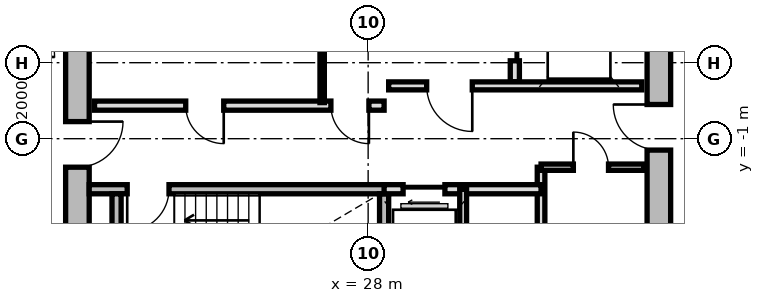
"""IFC4 building model, lengths in metres.
Left out: names, types, materials, properties, quantities, classifications, styles, units other than length and angle.
Written with IfcOpenShell. Run it as: python <this file> out.ifc"""

import sys

from ifc_helpers import new_model, si_unit, direction, frame, frame_2d, origin, place, context, subcontext, project, spatial, rectangle, extrude, source, transform, mapped, element, fill, save


model = new_model("IFC4")
c1 = context("Model", 3, precision=1e-05, world=origin(), true_north=direction((0.0, 1.0)))
c2 = subcontext(c1, "Body", "Model", "MODEL_VIEW")
j1 = project(units=[si_unit("LENGTHUNIT", "METRE"), si_unit("PLANEANGLEUNIT", "RADIAN")], contexts=[c1])
p1 = place(None, origin())
s1 = spatial("IfcSite", under=j1, at=p1, CompositionType="ELEMENT")
p2 = place(p1, origin())
s2 = spatial("IfcBuilding", under=s1, at=p2, CompositionType="ELEMENT")
p3 = place(p2, frame((0.0, 0.0, 134.3)))
s3 = spatial("IfcBuildingStorey", under=s2, at=p3, CompositionType="ELEMENT", Elevation=134.3)
m1 = source(origin(), c2, "Body", "SweptSolid", [
    extrude(rectangle(XDim=11.1, YDim=0.62, at=frame_2d((5.55, 0.0))), origin(), (0.0, 0.0, 1.0), 2.81),
])
p4 = place(p3, frame((20.35, -5.55, 0.0), z_axis=(0.0, 0.0, 1.0), x_axis=(0.0, 1.0, 0.0)))
e1 = element("IfcWall", 1, at=p4, inside=s3, PredefinedType="SHEAR", context=c2, shape_type="MappedRepresentation", body=[
    mapped(m1, transform((0.0, 0.0, 0.0), x_axis=(1.0, 0.0, 0.0), y_axis=(0.0, 1.0, 0.0), z_axis=(0.0, 0.0, 1.0), scale=1.0)),
])
p5 = place(p4, frame((3.8, 0.0, 0.0)))
e2 = element("IfcOpeningElement", 2, at=p5, cuts=e1, PredefinedType="OPENING", context=c2, shape_type="SweptSolid", body=[
    extrude(rectangle(XDim=1.2, YDim=2.15, at=frame_2d((0.6, 1.075))), frame((0.0, 0.32, 0.0), z_axis=(0.0, -1.0, 0.0), x_axis=(1.0, 0.0, 0.0)), (0.0, 0.0, 1.0), 0.64),
])
p6 = place(p3, frame((35.65, 5.55, 0.0), z_axis=(0.0, 0.0, 1.0), x_axis=(0.0, -1.0, 0.0)))
e3 = element("IfcWall", 3, at=p6, inside=s3, PredefinedType="SHEAR", context=c2, shape_type="MappedRepresentation", body=[
    mapped(m1, transform((0.0, 0.0, 0.0), x_axis=(1.0, 0.0, 0.0), y_axis=(0.0, 1.0, 0.0), z_axis=(0.0, 0.0, 1.0), scale=1.0)),
])
p7 = place(p6, frame((5.65, 0.0, 0.0)))
e4 = element("IfcOpeningElement", 4, at=p7, cuts=e3, PredefinedType="OPENING", context=c2, shape_type="SweptSolid", body=[
    extrude(rectangle(XDim=1.2, YDim=2.15, at=frame_2d((0.6, 1.075))), frame((0.0, 0.32, 0.0), z_axis=(0.0, -1.0, 0.0), x_axis=(1.0, 0.0, 0.0)), (0.0, 0.0, 1.0), 0.64),
])
p8 = place(p6, frame((9.3, 0.0, 0.0)))
e5 = element("IfcOpeningElement", 5, at=p8, cuts=e3, PredefinedType="OPENING", context=c2, shape_type="SweptSolid", body=[
    extrude(rectangle(XDim=1.0, YDim=2.1, at=frame_2d((0.5, 1.05))), frame((0.0, 0.32, 0.0), z_axis=(0.0, -1.0, 0.0), x_axis=(1.0, 0.0, 0.0)), (0.0, 0.0, 1.0), 0.64),
])
m2 = source(origin(), c2, "Body", "SweptSolid", [
    extrude(rectangle(XDim=7.88, YDim=0.24, at=frame_2d((3.94, 0.0))), origin(), (0.0, 0.0, 1.0), 2.81),
])
p9 = place(p3, frame((20.66, -2.33, 0.0), z_axis=(0.0, 0.0, 1.0), x_axis=(1.0, 0.0, 0.0)))
e6 = element("IfcWall", 6, at=p9, inside=s3, PredefinedType="PARTITIONING", context=c2, shape_type="MappedRepresentation", body=[
    mapped(m2, transform((0.0, 0.0, 0.0), x_axis=(1.0, 0.0, 0.0), y_axis=(0.0, 1.0, 0.0), z_axis=(0.0, 0.0, 1.0), scale=1.0)),
])
p10 = place(p9, frame((1.0, 0.0, 0.0)))
e7 = element("IfcOpeningElement", 7, at=p10, cuts=e6, PredefinedType="OPENING", context=c2, shape_type="SweptSolid", body=[
    extrude(rectangle(XDim=1.1, YDim=2.15, at=frame_2d((0.55, 1.075))), frame((0.0, 0.13, 0.0), z_axis=(0.0, -1.0, 0.0), x_axis=(1.0, 0.0, 0.0)), (0.0, 0.0, 1.0), 0.26),
])
m3 = source(origin(), c2, "Body", "SweptSolid", [
    extrude(rectangle(XDim=3.19, YDim=0.24, at=frame_2d((1.595, 0.0))), origin(), (0.0, 0.0, 1.0), 2.81),
])
for number, where, z_axis, x_axis in (
    (8, (21.38, -5.64, 0.0), (0.0, 0.0, 1.0), (0.0, 1.0, 0.0)),
    (9, (28.42, -5.64, 0.0), (0.0, 0.0, 1.0), (0.0, 1.0, 0.0)),
):
    element("IfcWall", number, at=place(p3, frame(where, z_axis=z_axis, x_axis=x_axis)), inside=s3, PredefinedType="PARTITIONING", context=c2, shape_type="MappedRepresentation", body=[
        mapped(m3, transform((0.0, 0.0, 0.0), x_axis=(1.0, 0.0, 0.0), y_axis=(0.0, 1.0, 0.0), z_axis=(0.0, 0.0, 1.0), scale=1.0)),
    ])
m4 = source(origin(), c2, "Body", "SweptSolid", [
    extrude(rectangle(XDim=5.0, YDim=0.24, at=frame_2d((2.5, 0.0))), origin(), (0.0, 0.0, 1.0), 2.795),
])
p11 = place(p3, frame((31.86, 0.5, 0.0), z_axis=(0.0, 0.0, 1.0), x_axis=(0.0, 1.0, 0.0)))
e10 = element("IfcWall", 10, at=p11, inside=s3, PredefinedType="PARTITIONING", context=c2, shape_type="MappedRepresentation", body=[
    mapped(m4, transform((0.0, 0.0, 0.0), x_axis=(1.0, 0.0, 0.0), y_axis=(0.0, 1.0, 0.0), z_axis=(0.0, 0.0, 1.0), scale=1.0)),
])
p12 = place(p11, frame((3.05, 0.0, 0.0)))
e11 = element("IfcOpeningElement", 11, at=p12, cuts=e10, PredefinedType="OPENING", context=c2, shape_type="SweptSolid", body=[
    extrude(rectangle(XDim=1.3, YDim=2.2, at=frame_2d((0.65, 1.1))), frame((0.0, 0.13, 0.0), z_axis=(0.0, -1.0, 0.0), x_axis=(1.0, 0.0, 0.0)), (0.0, 0.0, 1.0), 0.26),
])
p13 = place(p11, frame((0.55, 0.0, 0.0)))
e12 = element("IfcOpeningElement", 12, at=p13, cuts=e10, PredefinedType="OPENING", context=c2, shape_type="SweptSolid", body=[
    extrude(rectangle(XDim=1.3, YDim=2.2, at=frame_2d((0.65, 1.1))), frame((0.0, 0.13, 0.0), z_axis=(0.0, -1.0, 0.0), x_axis=(1.0, 0.0, 0.0)), (0.0, 0.0, 1.0), 0.26),
])
m5 = source(origin(), c2, "Body", "SweptSolid", [
    extrude(rectangle(XDim=6.66, YDim=0.21, at=frame_2d((3.33, 0.0))), origin(), (0.0, 0.0, 1.0), 2.795),
])
p14 = place(p3, frame((28.54, 0.39, 0.0), z_axis=(0.0, 0.0, 1.0), x_axis=(1.0, 0.0, 0.0)))
e13 = element("IfcWall", 13, at=p14, inside=s3, PredefinedType="PARTITIONING", context=c2, shape_type="MappedRepresentation", body=[
    mapped(m5, transform((0.0, 0.0, 0.0), x_axis=(1.0, 0.0, 0.0), y_axis=(0.0, 1.0, 0.0), z_axis=(0.0, 0.0, 1.0), scale=1.0)),
])
p15 = place(p14, frame((1.0, 0.0, 0.0)))
e14 = element("IfcOpeningElement", 14, at=p15, cuts=e13, PredefinedType="OPENING", context=c2, shape_type="SweptSolid", body=[
    extrude(rectangle(XDim=1.2, YDim=2.15, at=frame_2d((0.6, 1.075))), frame((0.0, 0.115, 0.0), z_axis=(0.0, -1.0, 0.0), x_axis=(1.0, 0.0, 0.0)), (0.0, 0.0, 1.0), 0.23),
])
m6 = source(origin(), c2, "Body", "SweptSolid", [
    extrude(rectangle(XDim=7.62, YDim=0.24, at=frame_2d((3.81, 0.0))), origin(), (0.0, 0.0, 1.0), 2.795),
])
p16 = place(p3, frame((20.8, -0.13, 0.0), z_axis=(0.0, 0.0, 1.0), x_axis=(1.0, 0.0, 0.0)))
e15 = element("IfcWall", 15, at=p16, inside=s3, PredefinedType="PARTITIONING", context=c2, shape_type="MappedRepresentation", body=[
    mapped(m6, transform((0.0, 0.0, 0.0), x_axis=(1.0, 0.0, 0.0), y_axis=(0.0, 1.0, 0.0), z_axis=(0.0, 0.0, 1.0), scale=1.0)),
])
p17 = place(p16, frame((6.22, 0.0, 0.0)))
e16 = element("IfcOpeningElement", 16, at=p17, cuts=e15, PredefinedType="OPENING", context=c2, shape_type="SweptSolid", body=[
    extrude(rectangle(XDim=1.0, YDim=2.1, at=frame_2d((0.5, 1.05))), frame((0.0, 0.13, 0.0), z_axis=(0.0, -1.0, 0.0), x_axis=(1.0, 0.0, 0.0)), (0.0, 0.0, 1.0), 0.26),
])
p18 = place(p16, frame((2.4, 0.0, 0.0)))
e17 = element("IfcOpeningElement", 17, at=p18, cuts=e15, PredefinedType="OPENING", context=c2, shape_type="SweptSolid", body=[
    extrude(rectangle(XDim=1.0, YDim=2.1, at=frame_2d((0.5, 1.05))), frame((0.0, 0.13, 0.0), z_axis=(0.0, -1.0, 0.0), x_axis=(1.0, 0.0, 0.0)), (0.0, 0.0, 1.0), 0.26),
])
m7 = source(origin(), c2, "Body", "SweptSolid", [
    extrude(rectangle(XDim=2.33, YDim=0.115, at=frame_2d((1.165, 0.0))), origin(), (0.0, 0.0, 1.0), 2.795),
])
p19 = place(p3, frame((26.79, -0.05, 0.0), z_axis=(0.0, 0.0, 1.0), x_axis=(0.0, 1.0, 0.0)))
e18 = element("IfcWall", 18, at=p19, inside=s3, PredefinedType="PARTITIONING", context=c2, shape_type="MappedRepresentation", body=[
    mapped(m7, transform((0.0, 0.0, 0.0), x_axis=(1.0, 0.0, 0.0), y_axis=(0.0, 1.0, 0.0), z_axis=(0.0, 0.0, 1.0), scale=1.0)),
])
m8 = source(origin(), c2, "Body", "SweptSolid", [
    extrude(rectangle(XDim=3.8, YDim=0.2, at=frame_2d((1.9, 0.0))), origin(), (0.0, 0.0, 1.0), 2.795),
])
p20 = place(p3, frame((32.55, -5.55, 0.0), z_axis=(0.0, 0.0, 1.0), x_axis=(0.0, 1.0, 0.0)))
e19 = element("IfcWall", 19, at=p20, inside=s3, PredefinedType="PARTITIONING", context=c2, shape_type="MappedRepresentation", body=[
    mapped(m8, transform((0.0, 0.0, 0.0), x_axis=(1.0, 0.0, 0.0), y_axis=(0.0, 1.0, 0.0), z_axis=(0.0, 0.0, 1.0), scale=1.0)),
])
m9 = source(origin(), c2, "Body", "SweptSolid", [
    extrude(rectangle(XDim=4.13, YDim=0.24, at=frame_2d((2.065, 0.0))), origin(), (0.0, 0.0, 1.0), 2.795),
])
p21 = place(p3, frame((28.42, -2.33, 0.0), z_axis=(0.0, 0.0, 1.0), x_axis=(1.0, 0.0, 0.0)))
e20 = element("IfcWall", 20, at=p21, inside=s3, PredefinedType="PARTITIONING", context=c2, shape_type="MappedRepresentation", body=[
    mapped(m9, transform((0.0, 0.0, 0.0), x_axis=(1.0, 0.0, 0.0), y_axis=(0.0, 1.0, 0.0), z_axis=(0.0, 0.0, 1.0), scale=1.0)),
])
p22 = place(p21, frame((0.5, 0.0, 0.0)))
e21 = element("IfcOpeningElement", 21, at=p22, cuts=e20, PredefinedType="OPENING", context=c2, shape_type="SweptSolid", body=[
    extrude(rectangle(XDim=1.1, YDim=2.2, at=frame_2d((0.55, 1.1))), frame((0.0, 0.13, 0.0), z_axis=(0.0, -1.0, 0.0), x_axis=(1.0, 0.0, 0.0)), (0.0, 0.0, 1.0), 0.26),
])
m10 = source(origin(), c2, "Body", "SweptSolid", [
    extrude(rectangle(XDim=3.22, YDim=0.18, at=frame_2d((1.61, 0.0))), origin(), (0.0, 0.0, 1.0), 2.795),
])
p23 = place(p3, frame((30.5, -5.55, 0.0), z_axis=(0.0, 0.0, 1.0), x_axis=(0.0, 1.0, 0.0)))
e22 = element("IfcWall", 22, at=p23, inside=s3, PredefinedType="PARTITIONING", context=c2, shape_type="MappedRepresentation", body=[
    mapped(m10, transform((0.0, 0.0, 0.0), x_axis=(1.0, 0.0, 0.0), y_axis=(0.0, 1.0, 0.0), z_axis=(0.0, 0.0, 1.0), scale=1.0)),
])
m11 = source(origin(), c2, "Body", "SweptSolid", [
    extrude(rectangle(XDim=2.7, YDim=0.165, at=frame_2d((1.35, 0.0))), origin(), (0.0, 0.0, 1.0), 2.795),
])
p24 = place(p3, frame((32.55, -1.75, 0.0), z_axis=(0.0, 0.0, 1.0), x_axis=(1.0, 0.0, 0.0)))
e23 = element("IfcWall", 23, at=p24, inside=s3, PredefinedType="PARTITIONING", context=c2, shape_type="MappedRepresentation", body=[
    mapped(m11, transform((0.0, 0.0, 0.0), x_axis=(1.0, 0.0, 0.0), y_axis=(0.0, 1.0, 0.0), z_axis=(0.0, 0.0, 1.0), scale=1.0)),
])
p25 = place(p24, frame((0.85, 0.0, 0.0)))
e24 = element("IfcOpeningElement", 24, at=p25, cuts=e23, PredefinedType="OPENING", context=c2, shape_type="SweptSolid", body=[
    extrude(rectangle(XDim=0.925, YDim=2.1, at=frame_2d((0.462, 1.05))), frame((0.0, 0.093, 0.0), z_axis=(0.0, -1.0, 0.0), x_axis=(1.0, 0.0, 0.0)), (0.0, 0.0, 1.0), 0.185),
])
m12 = source(origin(), c2, "Body", "SweptSolid", [
    extrude(rectangle(XDim=1.1, YDim=2.15, at=frame_2d((0.55, 1.075))), frame((0.0, 0.025, 0.0), z_axis=(0.0, -1.0, 0.0), x_axis=(1.0, 0.0, 0.0)), (0.0, 0.0, 1.0), 0.05),
])
p26 = place(p10, frame((1.1, 0.0, 0.0), z_axis=(0.0, 0.0, 1.0), x_axis=(-1.0, 0.0, 0.0)))
e25 = element("IfcDoor", 25, at=p26, inside=s3, OperationType="SINGLE_SWING_RIGHT", PredefinedType="DOOR", context=c2, shape_type="MappedRepresentation", body=[
    mapped(m12, transform((0.0, 0.0, 0.0), x_axis=(1.0, 0.0, 0.0), y_axis=(0.0, 1.0, 0.0), z_axis=(0.0, 0.0, 1.0), scale=1.0)),
])
fill(e7, e25)
m13 = source(origin(), c2, "Body", "SweptSolid", [
    extrude(rectangle(XDim=1.3, YDim=2.2, at=frame_2d((0.65, 1.1))), frame((0.0, 0.025, 0.0), z_axis=(0.0, -1.0, 0.0), x_axis=(1.0, 0.0, 0.0)), (0.0, 0.0, 1.0), 0.05),
])
p27 = place(p13, origin())
e26 = element("IfcDoor", 26, at=p27, inside=s3, OperationType="SLIDING_TO_RIGHT", PredefinedType="DOOR", context=c2, shape_type="MappedRepresentation", body=[
    mapped(m13, transform((0.0, 0.0, 0.0), x_axis=(1.0, 0.0, 0.0), y_axis=(0.0, 1.0, 0.0), z_axis=(0.0, 0.0, 1.0), scale=1.0)),
])
fill(e12, e26)
m14 = source(origin(), c2, "Body", "SweptSolid", [
    extrude(rectangle(XDim=1.2, YDim=2.15, at=frame_2d((0.6, 1.075))), frame((0.0, 0.025, 0.0), z_axis=(0.0, -1.0, 0.0), x_axis=(1.0, 0.0, 0.0)), (0.0, 0.0, 1.0), 0.05),
])
p28 = place(p15, frame((1.2, 0.0, 0.0), z_axis=(0.0, 0.0, 1.0), x_axis=(-1.0, 0.0, 0.0)))
e27 = element("IfcDoor", 27, at=p28, inside=s3, OperationType="SINGLE_SWING_LEFT", PredefinedType="DOOR", context=c2, shape_type="MappedRepresentation", body=[
    mapped(m14, transform((0.0, 0.0, 0.0), x_axis=(1.0, 0.0, 0.0), y_axis=(0.0, 1.0, 0.0), z_axis=(0.0, 0.0, 1.0), scale=1.0)),
])
fill(e14, e27)
p29 = place(p5, frame((1.2, 0.0, 0.0), z_axis=(0.0, 0.0, 1.0), x_axis=(-1.0, 0.0, 0.0)))
e28 = element("IfcDoor", 28, at=p29, inside=s3, OperationType="SINGLE_SWING_LEFT", PredefinedType="DOOR", context=c2, shape_type="MappedRepresentation", body=[
    mapped(m14, transform((0.0, 0.0, 0.0), x_axis=(1.0, 0.0, 0.0), y_axis=(0.0, 1.0, 0.0), z_axis=(0.0, 0.0, 1.0), scale=1.0)),
])
fill(e2, e28)
p30 = place(p7, frame((1.2, 0.0, 0.0), z_axis=(0.0, 0.0, 1.0), x_axis=(-1.0, 0.0, 0.0)))
e29 = element("IfcDoor", 29, at=p30, inside=s3, OperationType="SINGLE_SWING_RIGHT", PredefinedType="DOOR", context=c2, shape_type="MappedRepresentation", body=[
    mapped(m14, transform((0.0, 0.0, 0.0), x_axis=(1.0, 0.0, 0.0), y_axis=(0.0, 1.0, 0.0), z_axis=(0.0, 0.0, 1.0), scale=1.0)),
])
fill(e4, e29)
m15 = source(origin(), c2, "Body", "SweptSolid", [
    extrude(rectangle(XDim=1.0, YDim=2.1, at=frame_2d((0.5, 1.05))), frame((0.0, 0.025, 0.0), z_axis=(0.0, -1.0, 0.0), x_axis=(1.0, 0.0, 0.0)), (0.0, 0.0, 1.0), 0.05),
])
p31 = place(p17, frame((1.0, 0.0, 0.0), z_axis=(0.0, 0.0, 1.0), x_axis=(-1.0, 0.0, 0.0)))
e30 = element("IfcDoor", 30, at=p31, inside=s3, OperationType="SINGLE_SWING_LEFT", PredefinedType="DOOR", context=c2, shape_type="MappedRepresentation", body=[
    mapped(m15, transform((0.0, 0.0, 0.0), x_axis=(1.0, 0.0, 0.0), y_axis=(0.0, 1.0, 0.0), z_axis=(0.0, 0.0, 1.0), scale=1.0)),
])
fill(e16, e30)
p32 = place(p18, frame((1.0, 0.0, 0.0), z_axis=(0.0, 0.0, 1.0), x_axis=(-1.0, 0.0, 0.0)))
e31 = element("IfcDoor", 31, at=p32, inside=s3, OperationType="SINGLE_SWING_LEFT", PredefinedType="DOOR", context=c2, shape_type="MappedRepresentation", body=[
    mapped(m15, transform((0.0, 0.0, 0.0), x_axis=(1.0, 0.0, 0.0), y_axis=(0.0, 1.0, 0.0), z_axis=(0.0, 0.0, 1.0), scale=1.0)),
])
fill(e17, e31)
m16 = source(origin(), c2, "Body", "SweptSolid", [
    extrude(rectangle(XDim=1.1, YDim=2.2, at=frame_2d((0.55, 1.1))), frame((0.0, 0.025, 0.0), z_axis=(0.0, -1.0, 0.0), x_axis=(1.0, 0.0, 0.0)), (0.0, 0.0, 1.0), 0.05),
])
p33 = place(p22, frame((1.1, 0.0, 0.0), z_axis=(0.0, 0.0, 1.0), x_axis=(-1.0, 0.0, 0.0)))
e32 = element("IfcDoor", 32, at=p33, inside=s3, OperationType="SLIDING_TO_LEFT", PredefinedType="DOOR", context=c2, shape_type="MappedRepresentation", body=[
    mapped(m16, transform((0.0, 0.0, 0.0), x_axis=(1.0, 0.0, 0.0), y_axis=(0.0, 1.0, 0.0), z_axis=(0.0, 0.0, 1.0), scale=1.0)),
])
fill(e21, e32)
m17 = source(origin(), c2, "Body", "SweptSolid", [
    extrude(rectangle(XDim=0.925, YDim=2.1, at=frame_2d((0.462, 1.05))), frame((0.0, 0.025, 0.0), z_axis=(0.0, -1.0, 0.0), x_axis=(1.0, 0.0, 0.0)), (0.0, 0.0, 1.0), 0.05),
])
p34 = place(p25, origin())
e33 = element("IfcDoor", 33, at=p34, inside=s3, OperationType="SINGLE_SWING_LEFT", PredefinedType="DOOR", context=c2, shape_type="MappedRepresentation", body=[
    mapped(m17, transform((0.0, 0.0, 0.0), x_axis=(1.0, 0.0, 0.0), y_axis=(0.0, 1.0, 0.0), z_axis=(0.0, 0.0, 1.0), scale=1.0)),
])
fill(e24, e33)
save(model, sys.argv[1])
